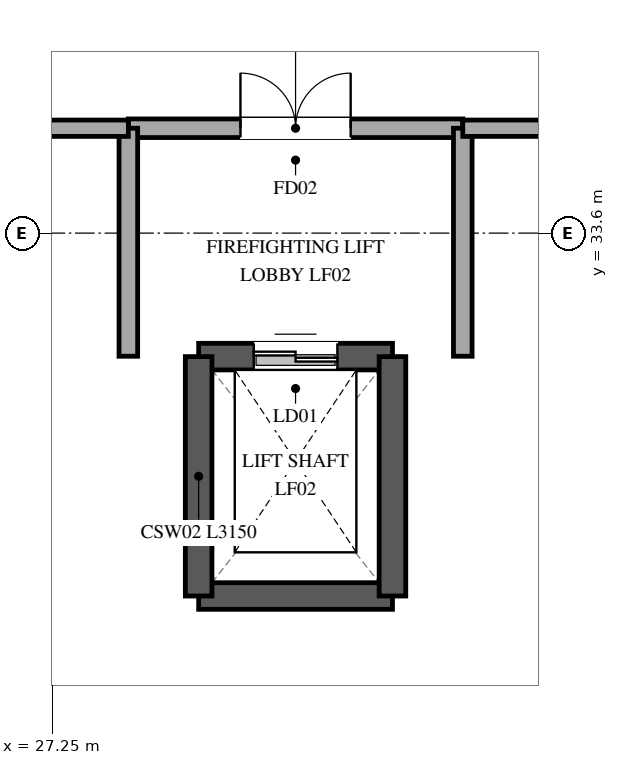
"""IFC4 building model, lengths in metres.
Left out: names, types, materials, properties, quantities, classifications, styles, units other than length and angle.
Written with IfcOpenShell. Run it as: python <this file> out.ifc"""

import sys

from ifc_helpers import new_model, si_unit, direction, frame, frame_2d, origin, place, context, subcontext, project, spatial, rectangle, extrude, element, fill, save


model = new_model("IFC4")
c1 = context("Model", 3, precision=1e-05, world=origin(), true_north=direction((0.0, 1.0)))
c2 = subcontext(c1, "Body", "Model", "MODEL_VIEW")
j1 = project(units=[si_unit("LENGTHUNIT", "METRE"), si_unit("PLANEANGLEUNIT", "RADIAN")], contexts=[c1])
p1 = place(None, origin())
s1 = spatial("IfcSite", under=j1, at=p1, CompositionType="ELEMENT")
p2 = place(p1, origin())
s2 = spatial("IfcBuilding", under=s1, at=p2, CompositionType="ELEMENT")
p3 = place(p2, frame((0.0, 0.0, -4.8)))
s3 = spatial("IfcBuildingStorey", under=s2, at=p3, CompositionType="ELEMENT", Elevation=-4.8)
p4 = place(p3, frame((29.175, 31.975, 0.0), z_axis=(0.0, 0.0, 1.0), x_axis=(1.0, 0.0, 0.0)))
e1 = element("IfcWall", 1, at=p4, inside=s3, PredefinedType="SHEAR", context=c2, shape_type="SweptSolid", body=[
    extrude(rectangle(XDim=2.55, YDim=0.35, at=frame_2d((1.275, 0.0))), origin(), (0.0, 0.0, 1.0), 4.8),
])
p5 = place(p4, frame((0.725, 0.0, 0.0)))
e2 = element("IfcOpeningElement", 2, at=p5, cuts=e1, PredefinedType="OPENING", context=c2, shape_type="SweptSolid", body=[
    extrude(rectangle(XDim=1.1, YDim=2.2, at=frame_2d((0.55, 1.1))), frame((0.0, 0.185, 0.0), z_axis=(0.0, -1.0, 0.0), x_axis=(1.0, 0.0, 0.0)), (0.0, 0.0, 1.0), 0.37),
])
p6 = place(p3, frame((31.725, 28.825, 0.0), z_axis=(0.0, 0.0, 1.0), x_axis=(-1.0, 0.0, 0.0)))
e3 = element("IfcWall", 3, at=p6, inside=s3, PredefinedType="SHEAR", context=c2, shape_type="SweptSolid", body=[
    extrude(rectangle(XDim=2.55, YDim=0.35, at=frame_2d((1.275, 0.0))), origin(), (0.0, 0.0, 1.0), 4.8),
])
for number, where, z_axis, x_axis in (
    (4, (29.175, 28.825, 0.0), (0.0, 0.0, 1.0), (0.0, 1.0, 0.0)),
    (5, (31.725, 31.975, 0.0), (0.0, 0.0, 1.0), (0.0, -1.0, 0.0)),
):
    element("IfcWall", number, at=place(p3, frame(where, z_axis=z_axis, x_axis=x_axis)), inside=s3, PredefinedType="SHEAR", context=c2, shape_type="SweptSolid", body=[
        extrude(rectangle(XDim=3.15, YDim=0.35, at=frame_2d((1.575, 0.0))), origin(), (0.0, 0.0, 1.0), 4.8),
    ])
p7 = place(p3, frame((28.25, 34.98, 0.0), z_axis=(0.0, 0.0, 1.0), x_axis=(1.0, 0.0, 0.0)))
e6 = element("IfcWall", 6, at=p7, inside=s3, PredefinedType="STANDARD", context=c2, shape_type="SweptSolid", body=[
    extrude(rectangle(XDim=4.4, YDim=0.245, at=frame_2d((2.2, 0.0))), origin(), (0.0, 0.0, 1.0), 4.44),
])
p8 = place(p7, frame((1.475, 0.0, 0.0)))
e7 = element("IfcOpeningElement", 7, at=p8, cuts=e6, PredefinedType="OPENING", context=c2, shape_type="SweptSolid", body=[
    extrude(rectangle(XDim=1.45, YDim=2.2, at=frame_2d((0.725, 1.1))), frame((0.0, 0.133, 0.0), z_axis=(0.0, -1.0, 0.0), x_axis=(1.0, 0.0, 0.0)), (0.0, 0.0, 1.0), 0.265),
])
for number, where, z_axis, x_axis in (
    (8, (28.25, 31.98, 0.0), (0.0, 0.0, 1.0), (0.0, 1.0, 0.0)),
    (9, (32.65, 34.98, 0.0), (0.0, 0.0, 1.0), (0.0, -1.0, 0.0)),
):
    element("IfcWall", number, at=place(p3, frame(where, z_axis=z_axis, x_axis=x_axis)), inside=s3, PredefinedType="STANDARD", context=c2, shape_type="SweptSolid", body=[
        extrude(rectangle(XDim=3.0, YDim=0.245, at=frame_2d((1.5, 0.0))), origin(), (0.0, 0.0, 1.0), 3.65),
    ])
p9 = place(p3, frame((28.25, 34.98, 0.0), z_axis=(0.0, 0.0, 1.0), x_axis=(-1.0, 0.0, 0.0)))
e10 = element("IfcWall", 10, at=p9, inside=s3, PredefinedType="PARTITIONING", context=c2, shape_type="SweptSolid", body=[
    extrude(rectangle(XDim=2.89, YDim=0.215, at=frame_2d((1.445, 0.0))), origin(), (0.0, 0.0, 1.0), 3.65),
])
p10 = place(p3, frame((44.6, 34.98, 0.0), z_axis=(0.0, 0.0, 1.0), x_axis=(-1.0, 0.0, 0.0)))
e11 = element("IfcWall", 11, at=p10, inside=s3, PredefinedType="PARTITIONING", context=c2, shape_type="SweptSolid", body=[
    extrude(rectangle(XDim=11.95, YDim=0.215, at=frame_2d((5.975, 0.0))), origin(), (0.0, 0.0, 1.0), 3.65),
])
p11 = place(p5, origin())
e12 = element("IfcDoor", 12, at=p11, inside=s3, OperationType="DOUBLE_DOOR_SLIDING", PredefinedType="DOOR", context=c2, shape_type="SweptSolid", body=[
    extrude(rectangle(XDim=1.1, YDim=2.2, at=frame_2d((0.55, 1.1))), frame((0.0, 0.025, 0.0), z_axis=(0.0, -1.0, 0.0), x_axis=(1.0, 0.0, 0.0)), (0.0, 0.0, 1.0), 0.05),
])
fill(e2, e12)
p12 = place(p8, origin())
e13 = element("IfcDoor", 13, at=p12, inside=s3, OperationType="DOUBLE_DOOR_SINGLE_SWING", PredefinedType="DOOR", context=c2, shape_type="SweptSolid", body=[
    extrude(rectangle(XDim=1.45, YDim=2.2, at=frame_2d((0.725, 1.1))), frame((0.0, 0.025, 0.0), z_axis=(0.0, -1.0, 0.0), x_axis=(1.0, 0.0, 0.0)), (0.0, 0.0, 1.0), 0.05),
])
fill(e7, e13)
save(model, sys.argv[1])
